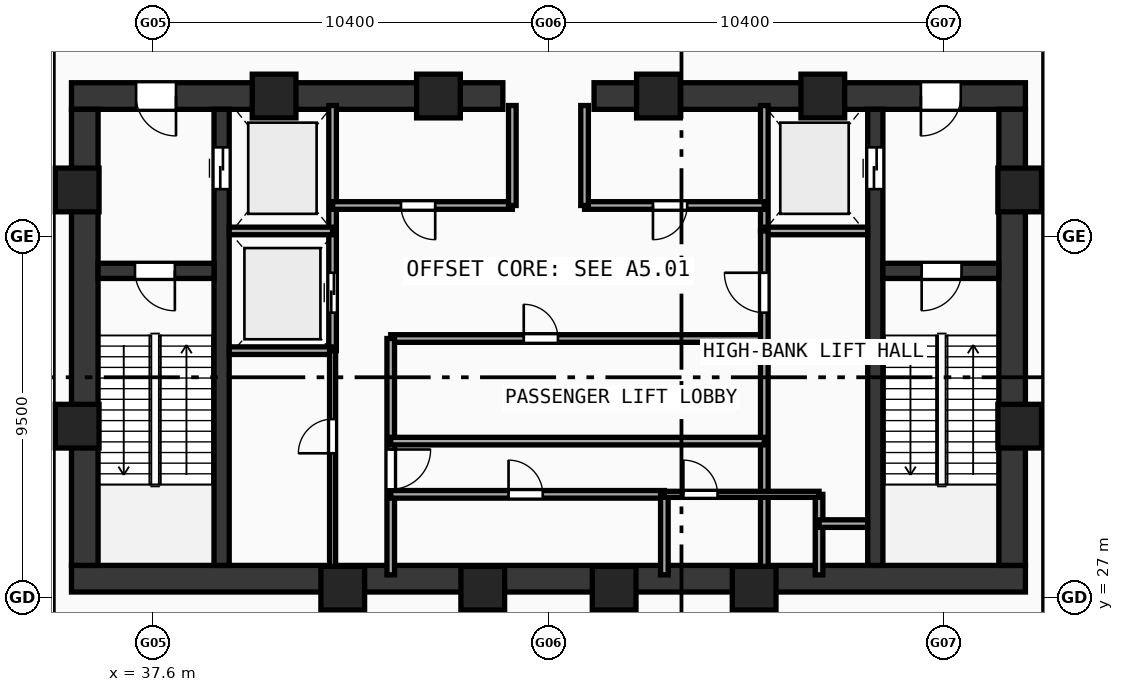
"""IFC4 building model, lengths in metres.
Left out: names, types, materials, properties, quantities, classifications, styles, units other than length and angle.
Written with IfcOpenShell. Run it as: python <this file> out.ifc"""

import sys

from ifc_helpers import new_model, si_unit, direction, frame, frame_2d, origin, origin_with_axes, origin_2d, place, context, subcontext, project, spatial, rectangle, hollow_rectangle, extrude, source, transform, mapped, element, fill, save


model = new_model("IFC4")
c1 = context("Model", 3, precision=1e-05, world=origin(), true_north=direction((0.0, 1.0)))
c2 = subcontext(c1, "Body", "Model", "MODEL_VIEW")
j1 = project(units=[si_unit("LENGTHUNIT", "METRE"), si_unit("PLANEANGLEUNIT", "RADIAN")], contexts=[c1])
p1 = place(None, origin())
s1 = spatial("IfcSite", under=j1, at=p1, CompositionType="ELEMENT")
p2 = place(p1, origin())
s2 = spatial("IfcBuilding", under=s1, at=p2, CompositionType="ELEMENT")
p3 = place(p2, frame((0.0, 0.0, -10.0)))
s3 = spatial("IfcBuildingStorey", under=s2, at=p3, CompositionType="ELEMENT", Elevation=-10.0)
p4 = place(p3, frame((35.45, 27.5, -0.6), z_axis=(0.0, 0.0, 1.0), x_axis=(1.0, 0.0, 0.0)))
e1 = element("IfcWall", 1, at=p4, inside=s3, PredefinedType="SHEAR", context=c2, shape_type="SweptSolid", body=[
    extrude(rectangle(XDim=25.1, YDim=0.7, at=frame_2d((12.55, 0.0))), origin(), (0.0, 0.0, 1.0), 5.5),
])
p5 = place(p3, frame((35.45, 40.2, -0.6), z_axis=(0.0, 0.0, 1.0), x_axis=(1.0, 0.0, 0.0)))
e2 = element("IfcWall", 2, at=p5, inside=s3, PredefinedType="SHEAR", context=c2, shape_type="SweptSolid", body=[
    extrude(rectangle(XDim=11.35, YDim=0.7, at=frame_2d((5.675, 0.0))), origin(), (0.0, 0.0, 1.0), 5.5),
])
p6 = place(p5, frame((1.7, 0.0, 0.6)))
e3 = element("IfcOpeningElement", 3, at=p6, cuts=e2, PredefinedType="OPENING", context=c2, shape_type="SweptSolid", body=[
    extrude(rectangle(XDim=1.05, YDim=2.1, at=frame_2d((0.525, 1.05))), frame((0.0, 0.36, 0.0), z_axis=(0.0, -1.0, 0.0), x_axis=(1.0, 0.0, 0.0)), (0.0, 0.0, 1.0), 0.72),
])
p7 = place(p3, frame((49.2, 40.2, -0.6), z_axis=(0.0, 0.0, 1.0), x_axis=(1.0, 0.0, 0.0)))
e4 = element("IfcWall", 4, at=p7, inside=s3, PredefinedType="SHEAR", context=c2, shape_type="SweptSolid", body=[
    extrude(rectangle(XDim=11.35, YDim=0.7, at=frame_2d((5.675, 0.0))), origin(), (0.0, 0.0, 1.0), 5.5),
])
p8 = place(p7, frame((8.6, 0.0, 0.6)))
e5 = element("IfcOpeningElement", 5, at=p8, cuts=e4, PredefinedType="OPENING", context=c2, shape_type="SweptSolid", body=[
    extrude(rectangle(XDim=1.05, YDim=2.1, at=frame_2d((0.525, 1.05))), frame((0.0, 0.36, 0.0), z_axis=(0.0, -1.0, 0.0), x_axis=(1.0, 0.0, 0.0)), (0.0, 0.0, 1.0), 0.72),
])
for number, where, z_axis, x_axis in (
    (6, (35.8, 27.85, -0.6), (0.0, 0.0, 1.0), (0.0, 1.0, 0.0)),
    (7, (60.2, 27.85, -0.6), (0.0, 0.0, 1.0), (0.0, 1.0, 0.0)),
):
    element("IfcWall", number, at=place(p3, frame(where, z_axis=z_axis, x_axis=x_axis)), inside=s3, PredefinedType="SHEAR", context=c2, shape_type="SweptSolid", body=[
        extrude(rectangle(XDim=12.0, YDim=0.7, at=frame_2d((6.0, 0.0))), origin(), (0.0, 0.0, 1.0), 5.5),
    ])
p9 = place(p3, frame((39.4, 27.85, -0.6), z_axis=(0.0, 0.0, 1.0), x_axis=(0.0, 1.0, 0.0)))
e8 = element("IfcWall", 8, at=p9, inside=s3, PredefinedType="SHEAR", context=c2, shape_type="SweptSolid", body=[
    extrude(rectangle(XDim=12.0, YDim=0.4, at=frame_2d((6.0, 0.0))), origin(), (0.0, 0.0, 1.0), 5.5),
])
p10 = place(p9, frame((9.9, 0.0, 0.6)))
e9 = element("IfcOpeningElement", 9, at=p10, cuts=e8, PredefinedType="OPENING", context=c2, shape_type="SweptSolid", body=[
    extrude(rectangle(XDim=1.1, YDim=2.1, at=frame_2d((0.55, 1.05))), frame((0.0, 0.21, 0.0), z_axis=(0.0, -1.0, 0.0), x_axis=(1.0, 0.0, 0.0)), (0.0, 0.0, 1.0), 0.42),
])
p11 = place(p3, frame((56.6, 27.85, -0.6), z_axis=(0.0, 0.0, 1.0), x_axis=(0.0, 1.0, 0.0)))
e10 = element("IfcWall", 10, at=p11, inside=s3, PredefinedType="SHEAR", context=c2, shape_type="SweptSolid", body=[
    extrude(rectangle(XDim=12.0, YDim=0.4, at=frame_2d((6.0, 0.0))), origin(), (0.0, 0.0, 1.0), 5.5),
])
p12 = place(p11, frame((9.9, 0.0, 0.6)))
e11 = element("IfcOpeningElement", 11, at=p12, cuts=e10, PredefinedType="OPENING", context=c2, shape_type="SweptSolid", body=[
    extrude(rectangle(XDim=1.1, YDim=2.1, at=frame_2d((0.55, 1.05))), frame((0.0, 0.21, 0.0), z_axis=(0.0, -1.0, 0.0), x_axis=(1.0, 0.0, 0.0)), (0.0, 0.0, 1.0), 0.42),
])
p13 = place(p3, frame((36.15, 35.6, -0.6), z_axis=(0.0, 0.0, 1.0), x_axis=(1.0, 0.0, 0.0)))
e12 = element("IfcWall", 12, at=p13, inside=s3, PredefinedType="SHEAR", context=c2, shape_type="SweptSolid", body=[
    extrude(rectangle(XDim=3.05, YDim=0.4, at=frame_2d((1.525, 0.0))), origin(), (0.0, 0.0, 1.0), 5.5),
])
p14 = place(p13, frame((0.97, 0.0, 0.6)))
e13 = element("IfcOpeningElement", 13, at=p14, cuts=e12, PredefinedType="OPENING", context=c2, shape_type="SweptSolid", body=[
    extrude(rectangle(XDim=1.05, YDim=2.1, at=frame_2d((0.525, 1.05))), frame((0.0, 0.21, 0.0), z_axis=(0.0, -1.0, 0.0), x_axis=(1.0, 0.0, 0.0)), (0.0, 0.0, 1.0), 0.42),
])
p15 = place(p3, frame((56.8, 35.6, -0.6), z_axis=(0.0, 0.0, 1.0), x_axis=(1.0, 0.0, 0.0)))
e14 = element("IfcWall", 14, at=p15, inside=s3, PredefinedType="SHEAR", context=c2, shape_type="SweptSolid", body=[
    extrude(rectangle(XDim=3.05, YDim=0.4, at=frame_2d((1.525, 0.0))), origin(), (0.0, 0.0, 1.0), 5.5),
])
p16 = place(p15, frame((1.02, 0.0, 0.6)))
e15 = element("IfcOpeningElement", 15, at=p16, cuts=e14, PredefinedType="OPENING", context=c2, shape_type="SweptSolid", body=[
    extrude(rectangle(XDim=1.05, YDim=2.1, at=frame_2d((0.525, 1.05))), frame((0.0, 0.21, 0.0), z_axis=(0.0, -1.0, 0.0), x_axis=(1.0, 0.0, 0.0)), (0.0, 0.0, 1.0), 0.42),
])
m1 = source(origin(), c2, "Body", "SweptSolid", [
    extrude(hollow_rectangle(XDim=1.15, YDim=1.15, WallThickness=0.048, at=origin_2d()), origin(), (0.0, 0.0, 1.0), 5.5),
])
for number, where, z_axis, x_axis in (
    (16, (42.588, 27.25, -0.6), (0.0, 0.0, 1.0), (1.0, 0.0, 0.0)),
    (17, (46.272, 27.25, -0.6), (0.0, 0.0, 1.0), (1.0, 0.0, 0.0)),
    (18, (49.729, 27.25, -0.6), (0.0, 0.0, 1.0), (1.0, 0.0, 0.0)),
    (19, (53.412, 27.25, -0.6), (0.0, 0.0, 1.0), (1.0, 0.0, 0.0)),
    (20, (60.4, 31.513, -0.6), (0.0, 0.0, 1.0), (1.0, 0.0, 0.0)),
    (21, (60.4, 37.729, -0.6), (0.0, 0.0, 1.0), (1.0, 0.0, 0.0)),
    (22, (55.219, 40.2, -0.6), (0.0, 0.0, 1.0), (1.0, 0.0, 0.0)),
    (23, (50.894, 40.2, -0.6), (0.0, 0.0, 1.0), (1.0, 0.0, 0.0)),
    (24, (45.106, 40.2, -0.6), (0.0, 0.0, 1.0), (1.0, 0.0, 0.0)),
    (25, (40.781, 40.2, -0.6), (0.0, 0.0, 1.0), (1.0, 0.0, 0.0)),
    (26, (35.6, 37.729, -0.6), (0.0, 0.0, 1.0), (1.0, 0.0, 0.0)),
    (27, (35.6, 31.513, -0.6), (0.0, 0.0, 1.0), (1.0, 0.0, 0.0)),
):
    element("IfcColumn", number, at=place(p3, frame(where, z_axis=z_axis, x_axis=x_axis)), inside=s3, PredefinedType="COLUMN", context=c2, shape_type="MappedRepresentation", body=[
        mapped(m1, transform((0.0, 0.0, 0.0), scale=1.0)),
    ])
p17 = place(p3, frame((42.32, 33.5, 0.0), z_axis=(0.0, 0.0, 1.0), x_axis=(0.0, 1.0, 0.0)))
e28 = element("IfcWall", 28, at=p17, inside=s3, PredefinedType="SOLIDWALL", context=c2, shape_type="SweptSolid", body=[
    extrude(rectangle(XDim=6.45, YDim=0.2, at=frame_2d((3.225, 0.0))), origin(), (0.0, 0.0, 1.0), 4.9),
])
p18 = place(p17, frame((1.0, 0.0, 0.0)))
e29 = element("IfcOpeningElement", 29, at=p18, cuts=e28, PredefinedType="OPENING", context=c2, shape_type="SweptSolid", body=[
    extrude(rectangle(XDim=1.05, YDim=2.1, at=frame_2d((0.525, 1.05))), frame((0.0, 0.11, 0.0), z_axis=(0.0, -1.0, 0.0), x_axis=(1.0, 0.0, 0.0)), (0.0, 0.0, 1.0), 0.22),
])
for number, where, z_axis, x_axis in (
    (30, (39.6, 36.65, 0.0), (0.0, 0.0, 1.0), (1.0, 0.0, 0.0)),
    (31, (39.6, 33.5, 0.0), (0.0, 0.0, 1.0), (1.0, 0.0, 0.0)),
):
    element("IfcWall", number, at=place(p3, frame(where, z_axis=z_axis, x_axis=x_axis)), inside=s3, PredefinedType="SOLIDWALL", context=c2, shape_type="SweptSolid", body=[
        extrude(rectangle(XDim=2.72, YDim=0.2, at=frame_2d((1.36, 0.0))), origin(), (0.0, 0.0, 1.0), 4.9),
    ])
p19 = place(p3, frame((53.68, 36.65, 0.0), z_axis=(0.0, 0.0, 1.0), x_axis=(0.0, 1.0, 0.0)))
e32 = element("IfcWall", 32, at=p19, inside=s3, PredefinedType="SOLIDWALL", context=c2, shape_type="SweptSolid", body=[
    extrude(rectangle(XDim=3.3, YDim=0.2, at=frame_2d((1.65, 0.0))), origin(), (0.0, 0.0, 1.0), 4.9),
])
p20 = place(p3, frame((53.68, 36.65, 0.0), z_axis=(0.0, 0.0, 1.0), x_axis=(1.0, 0.0, 0.0)))
e33 = element("IfcWall", 33, at=p20, inside=s3, PredefinedType="SOLIDWALL", context=c2, shape_type="SweptSolid", body=[
    extrude(rectangle(XDim=2.72, YDim=0.2, at=frame_2d((1.36, 0.0))), origin(), (0.0, 0.0, 1.0), 4.9),
])
p21 = place(p3, frame((42.32, 37.32, 0.0), z_axis=(0.0, 0.0, 1.0), x_axis=(1.0, 0.0, 0.0)))
e34 = element("IfcWall", 34, at=p21, inside=s3, PredefinedType="SOLIDWALL", context=c2, shape_type="SweptSolid", body=[
    extrude(rectangle(XDim=4.73, YDim=0.2, at=frame_2d((2.365, 0.0))), origin(), (0.0, 0.0, 1.0), 4.9),
])
p22 = place(p21, frame((1.8, 0.0, 0.0)))
e35 = element("IfcOpeningElement", 35, at=p22, cuts=e34, PredefinedType="OPENING", context=c2, shape_type="SweptSolid", body=[
    extrude(rectangle(XDim=0.9, YDim=2.1, at=frame_2d((0.45, 1.05))), frame((0.0, 0.11, 0.0), z_axis=(0.0, -1.0, 0.0), x_axis=(1.0, 0.0, 0.0)), (0.0, 0.0, 1.0), 0.22),
])
p23 = place(p3, frame((48.95, 37.32, 0.0), z_axis=(0.0, 0.0, 1.0), x_axis=(1.0, 0.0, 0.0)))
e36 = element("IfcWall", 36, at=p23, inside=s3, PredefinedType="SOLIDWALL", context=c2, shape_type="SweptSolid", body=[
    extrude(rectangle(XDim=4.73, YDim=0.2, at=frame_2d((2.365, 0.0))), origin(), (0.0, 0.0, 1.0), 4.9),
])
p24 = place(p23, frame((1.8, 0.0, 0.0)))
e37 = element("IfcOpeningElement", 37, at=p24, cuts=e36, PredefinedType="OPENING", context=c2, shape_type="SweptSolid", body=[
    extrude(rectangle(XDim=0.9, YDim=2.1, at=frame_2d((0.45, 1.05))), frame((0.0, 0.11, 0.0), z_axis=(0.0, -1.0, 0.0), x_axis=(1.0, 0.0, 0.0)), (0.0, 0.0, 1.0), 0.22),
])
for number, where, z_axis, x_axis in (
    (38, (47.05, 37.32, 0.0), (0.0, 0.0, 1.0), (0.0, 1.0, 0.0)),
    (39, (48.95, 37.32, 0.0), (0.0, 0.0, 1.0), (0.0, 1.0, 0.0)),
):
    element("IfcWall", number, at=place(p3, frame(where, z_axis=z_axis, x_axis=x_axis)), inside=s3, PredefinedType="SOLIDWALL", context=c2, shape_type="SweptSolid", body=[
        extrude(rectangle(XDim=2.63, YDim=0.2, at=frame_2d((1.315, 0.0))), origin(), (0.0, 0.0, 1.0), 4.9),
    ])
p25 = place(p3, frame((43.85, 33.82, 0.0), z_axis=(0.0, 0.0, 1.0), x_axis=(1.0, 0.0, 0.0)))
e40 = element("IfcWall", 40, at=p25, inside=s3, PredefinedType="SOLIDWALL", context=c2, shape_type="SweptSolid", body=[
    extrude(rectangle(XDim=9.83, YDim=0.2, at=frame_2d((4.915, 0.0))), origin(), (0.0, 0.0, 1.0), 4.9),
])
p26 = place(p25, frame((3.5, 0.0, 0.0)))
e41 = element("IfcOpeningElement", 41, at=p26, cuts=e40, PredefinedType="OPENING", context=c2, shape_type="SweptSolid", body=[
    extrude(rectangle(XDim=0.9, YDim=2.1, at=frame_2d((0.45, 1.05))), frame((0.0, 0.11, 0.0), z_axis=(0.0, -1.0, 0.0), x_axis=(1.0, 0.0, 0.0)), (0.0, 0.0, 1.0), 0.22),
])
p27 = place(p3, frame((43.85, 27.6, 0.0), z_axis=(0.0, 0.0, 1.0), x_axis=(0.0, 1.0, 0.0)))
e42 = element("IfcWall", 42, at=p27, inside=s3, PredefinedType="SOLIDWALL", context=c2, shape_type="SweptSolid", body=[
    extrude(rectangle(XDim=6.22, YDim=0.2, at=frame_2d((3.11, 0.0))), origin(), (0.0, 0.0, 1.0), 4.9),
])
p28 = place(p27, frame((2.25, 0.0, 0.0)))
e43 = element("IfcOpeningElement", 43, at=p28, cuts=e42, PredefinedType="OPENING", context=c2, shape_type="SweptSolid", body=[
    extrude(rectangle(XDim=1.05, YDim=2.1, at=frame_2d((0.525, 1.05))), frame((0.0, 0.11, 0.0), z_axis=(0.0, -1.0, 0.0), x_axis=(1.0, 0.0, 0.0)), (0.0, 0.0, 1.0), 0.22),
])
p29 = place(p3, frame((53.68, 27.6, 0.0), z_axis=(0.0, 0.0, 1.0), x_axis=(0.0, 1.0, 0.0)))
e44 = element("IfcWall", 44, at=p29, inside=s3, PredefinedType="SOLIDWALL", context=c2, shape_type="SweptSolid", body=[
    extrude(rectangle(XDim=9.05, YDim=0.2, at=frame_2d((4.525, 0.0))), origin(), (0.0, 0.0, 1.0), 4.9),
])
p30 = place(p29, frame((6.9, 0.0, 0.0)))
e45 = element("IfcOpeningElement", 45, at=p30, cuts=e44, PredefinedType="OPENING", context=c2, shape_type="SweptSolid", body=[
    extrude(rectangle(XDim=1.05, YDim=2.1, at=frame_2d((0.525, 1.05))), frame((0.0, 0.11, 0.0), z_axis=(0.0, -1.0, 0.0), x_axis=(1.0, 0.0, 0.0)), (0.0, 0.0, 1.0), 0.22),
])
p31 = place(p3, frame((43.85, 29.72, 0.0), z_axis=(0.0, 0.0, 1.0), x_axis=(1.0, 0.0, 0.0)))
e46 = element("IfcWall", 46, at=p31, inside=s3, PredefinedType="SOLIDWALL", context=c2, shape_type="SweptSolid", body=[
    extrude(rectangle(XDim=7.2, YDim=0.2, at=frame_2d((3.6, 0.0))), origin(), (0.0, 0.0, 1.0), 4.9),
])
p32 = place(p31, frame((3.1, 0.0, 0.0)))
e47 = element("IfcOpeningElement", 47, at=p32, cuts=e46, PredefinedType="OPENING", context=c2, shape_type="SweptSolid", body=[
    extrude(rectangle(XDim=0.9, YDim=2.1, at=frame_2d((0.45, 1.05))), frame((0.0, 0.11, 0.0), z_axis=(0.0, -1.0, 0.0), x_axis=(1.0, 0.0, 0.0)), (0.0, 0.0, 1.0), 0.22),
])
p33 = place(p3, frame((51.05, 27.6, 0.0), z_axis=(0.0, 0.0, 1.0), x_axis=(0.0, 1.0, 0.0)))
e48 = element("IfcWall", 48, at=p33, inside=s3, PredefinedType="SOLIDWALL", context=c2, shape_type="SweptSolid", body=[
    extrude(rectangle(XDim=2.12, YDim=0.2, at=frame_2d((1.06, 0.0))), origin(), (0.0, 0.0, 1.0), 4.9),
])
p34 = place(p3, frame((43.85, 31.12, 0.0), z_axis=(0.0, 0.0, 1.0), x_axis=(1.0, 0.0, 0.0)))
e49 = element("IfcWall", 49, at=p34, inside=s3, PredefinedType="SOLIDWALL", context=c2, shape_type="SweptSolid", body=[
    extrude(rectangle(XDim=9.83, YDim=0.2, at=frame_2d((4.915, 0.0))), origin(), (0.0, 0.0, 1.0), 4.9),
])
p35 = place(p3, frame((55.12, 27.6, 0.0), z_axis=(0.0, 0.0, 1.0), x_axis=(0.0, 1.0, 0.0)))
e50 = element("IfcWall", 50, at=p35, inside=s3, PredefinedType="SOLIDWALL", context=c2, shape_type="SweptSolid", body=[
    extrude(rectangle(XDim=2.12, YDim=0.2, at=frame_2d((1.06, 0.0))), origin(), (0.0, 0.0, 1.0), 4.9),
])
p36 = place(p3, frame((55.12, 28.95, 0.0), z_axis=(0.0, 0.0, 1.0), x_axis=(1.0, 0.0, 0.0)))
e51 = element("IfcWall", 51, at=p36, inside=s3, PredefinedType="SOLIDWALL", context=c2, shape_type="SweptSolid", body=[
    extrude(rectangle(XDim=1.28, YDim=0.2, at=frame_2d((0.64, 0.0))), origin(), (0.0, 0.0, 1.0), 4.9),
])
p37 = place(p3, frame((42.32, 27.6, 0.0), z_axis=(0.0, 0.0, 1.0), x_axis=(0.0, 1.0, 0.0)))
e52 = element("IfcWall", 52, at=p37, inside=s3, PredefinedType="PARTITIONING", context=c2, shape_type="SweptSolid", body=[
    extrude(rectangle(XDim=5.9, YDim=0.16, at=frame_2d((2.95, 0.0))), origin(), (0.0, 0.0, 1.0), 4.9),
])
p38 = place(p37, frame((3.2, 0.0, 0.0)))
e53 = element("IfcOpeningElement", 53, at=p38, cuts=e52, PredefinedType="OPENING", context=c2, shape_type="SweptSolid", body=[
    extrude(rectangle(XDim=0.9, YDim=2.1, at=frame_2d((0.45, 1.05))), frame((0.0, 0.09, 0.0), z_axis=(0.0, -1.0, 0.0), x_axis=(1.0, 0.0, 0.0)), (0.0, 0.0, 1.0), 0.18),
])
p39 = place(p3, frame((51.05, 29.72, 0.0), z_axis=(0.0, 0.0, 1.0), x_axis=(1.0, 0.0, 0.0)))
e54 = element("IfcWall", 54, at=p39, inside=s3, PredefinedType="PARTITIONING", context=c2, shape_type="SweptSolid", body=[
    extrude(rectangle(XDim=4.07, YDim=0.16, at=frame_2d((2.035, 0.0))), origin(), (0.0, 0.0, 1.0), 4.9),
])
p40 = place(p39, frame((0.5, 0.0, 0.0)))
e55 = element("IfcOpeningElement", 55, at=p40, cuts=e54, PredefinedType="OPENING", context=c2, shape_type="SweptSolid", body=[
    extrude(rectangle(XDim=0.9, YDim=2.1, at=frame_2d((0.45, 1.05))), frame((0.0, 0.09, 0.0), z_axis=(0.0, -1.0, 0.0), x_axis=(1.0, 0.0, 0.0)), (0.0, 0.0, 1.0), 0.18),
])
m2 = source(origin(), c2, "Body", "SweptSolid", [
    extrude(rectangle(XDim=1.05, YDim=2.1, at=frame_2d((0.525, 1.05))), frame((0.0, 0.025, 0.0), z_axis=(0.0, -1.0, 0.0), x_axis=(1.0, 0.0, 0.0)), (0.0, 0.0, 1.0), 0.05),
])
p41 = place(p14, frame((1.05, 0.0, 0.0), z_axis=(0.0, 0.0, 1.0), x_axis=(-1.0, 0.0, 0.0)))
e56 = element("IfcDoor", 56, at=p41, inside=s3, OperationType="SINGLE_SWING_LEFT", PredefinedType="DOOR", context=c2, shape_type="MappedRepresentation", body=[
    mapped(m2, transform((0.0, 0.0, 0.0), scale=1.0)),
])
fill(e13, e56)
p42 = place(p16, frame((1.05, 0.0, 0.0), z_axis=(0.0, 0.0, 1.0), x_axis=(-1.0, 0.0, 0.0)))
e57 = element("IfcDoor", 57, at=p42, inside=s3, OperationType="SINGLE_SWING_RIGHT", PredefinedType="DOOR", context=c2, shape_type="MappedRepresentation", body=[
    mapped(m2, transform((0.0, 0.0, 0.0), scale=1.0)),
])
fill(e15, e57)
p43 = place(p6, frame((1.05, 0.0, 0.0), z_axis=(0.0, 0.0, 1.0), x_axis=(-1.0, 0.0, 0.0)))
e58 = element("IfcDoor", 58, at=p43, inside=s3, OperationType="SINGLE_SWING_LEFT", PredefinedType="DOOR", context=c2, shape_type="MappedRepresentation", body=[
    mapped(m2, transform((0.0, 0.0, 0.0), scale=1.0)),
])
fill(e3, e58)
p44 = place(p8, frame((1.05, 0.0, 0.0), z_axis=(0.0, 0.0, 1.0), x_axis=(-1.0, 0.0, 0.0)))
e59 = element("IfcDoor", 59, at=p44, inside=s3, OperationType="SINGLE_SWING_RIGHT", PredefinedType="DOOR", context=c2, shape_type="MappedRepresentation", body=[
    mapped(m2, transform((0.0, 0.0, 0.0), scale=1.0)),
])
fill(e5, e59)
m3 = source(origin(), c2, "Body", "SweptSolid", [
    extrude(rectangle(XDim=1.1, YDim=2.1, at=frame_2d((0.55, 1.05))), frame((0.0, 0.025, 0.0), z_axis=(0.0, -1.0, 0.0), x_axis=(1.0, 0.0, 0.0)), (0.0, 0.0, 1.0), 0.05),
])
p45 = place(p10, frame((1.1, 0.0, 0.0), z_axis=(0.0, 0.0, 1.0), x_axis=(-1.0, 0.0, 0.0)))
e60 = element("IfcDoor", 60, at=p45, inside=s3, OperationType="DOUBLE_DOOR_SLIDING", PredefinedType="DOOR", context=c2, shape_type="MappedRepresentation", body=[
    mapped(m3, transform((0.0, 0.0, 0.0), scale=1.0)),
])
fill(e9, e60)
p46 = place(p12, origin_with_axes())
e61 = element("IfcDoor", 61, at=p46, inside=s3, OperationType="DOUBLE_DOOR_SLIDING", PredefinedType="DOOR", context=c2, shape_type="MappedRepresentation", body=[
    mapped(m3, transform((0.0, 0.0, 0.0), scale=1.0)),
])
fill(e11, e61)
p47 = place(p18, origin_with_axes())
e62 = element("IfcDoor", 62, at=p47, inside=s3, OperationType="DOUBLE_DOOR_SLIDING", PredefinedType="DOOR", context=c2, shape_type="MappedRepresentation", body=[
    mapped(m2, transform((0.0, 0.0, 0.0), scale=1.0)),
])
fill(e29, e62)
m4 = source(origin(), c2, "Body", "SweptSolid", [
    extrude(rectangle(XDim=0.9, YDim=2.1, at=frame_2d((0.45, 1.05))), frame((0.0, 0.025, 0.0), z_axis=(0.0, -1.0, 0.0), x_axis=(1.0, 0.0, 0.0)), (0.0, 0.0, 1.0), 0.05),
])
p48 = place(p22, frame((0.9, 0.0, 0.0), z_axis=(0.0, 0.0, 1.0), x_axis=(-1.0, 0.0, 0.0)))
e63 = element("IfcDoor", 63, at=p48, inside=s3, OperationType="SINGLE_SWING_LEFT", PredefinedType="DOOR", context=c2, shape_type="MappedRepresentation", body=[
    mapped(m4, transform((0.0, 0.0, 0.0), scale=1.0)),
])
fill(e35, e63)
p49 = place(p24, frame((0.9, 0.0, 0.0), z_axis=(0.0, 0.0, 1.0), x_axis=(-1.0, 0.0, 0.0)))
e64 = element("IfcDoor", 64, at=p49, inside=s3, OperationType="SINGLE_SWING_RIGHT", PredefinedType="DOOR", context=c2, shape_type="MappedRepresentation", body=[
    mapped(m4, transform((0.0, 0.0, 0.0), scale=1.0)),
])
fill(e37, e64)
p50 = place(p26, origin_with_axes())
e65 = element("IfcDoor", 65, at=p50, inside=s3, OperationType="SINGLE_SWING_LEFT", PredefinedType="DOOR", context=c2, shape_type="MappedRepresentation", body=[
    mapped(m4, transform((0.0, 0.0, 0.0), scale=1.0)),
])
fill(e41, e65)
p51 = place(p28, frame((1.05, 0.0, 0.0), z_axis=(0.0, 0.0, 1.0), x_axis=(-1.0, 0.0, 0.0)))
e66 = element("IfcDoor", 66, at=p51, inside=s3, OperationType="SINGLE_SWING_LEFT", PredefinedType="DOOR", context=c2, shape_type="MappedRepresentation", body=[
    mapped(m2, transform((0.0, 0.0, 0.0), scale=1.0)),
])
fill(e43, e66)
p52 = place(p30, origin_with_axes())
e67 = element("IfcDoor", 67, at=p52, inside=s3, OperationType="SINGLE_SWING_RIGHT", PredefinedType="DOOR", context=c2, shape_type="MappedRepresentation", body=[
    mapped(m2, transform((0.0, 0.0, 0.0), scale=1.0)),
])
fill(e45, e67)
p53 = place(p32, origin_with_axes())
e68 = element("IfcDoor", 68, at=p53, inside=s3, OperationType="SINGLE_SWING_LEFT", PredefinedType="DOOR", context=c2, shape_type="MappedRepresentation", body=[
    mapped(m4, transform((0.0, 0.0, 0.0), scale=1.0)),
])
fill(e47, e68)
p54 = place(p38, origin_with_axes())
e69 = element("IfcDoor", 69, at=p54, inside=s3, OperationType="SINGLE_SWING_LEFT", PredefinedType="DOOR", context=c2, shape_type="MappedRepresentation", body=[
    mapped(m4, transform((0.0, 0.0, 0.0), scale=1.0)),
])
fill(e53, e69)
p55 = place(p40, origin_with_axes())
e70 = element("IfcDoor", 70, at=p55, inside=s3, OperationType="SINGLE_SWING_LEFT", PredefinedType="DOOR", context=c2, shape_type="MappedRepresentation", body=[
    mapped(m4, transform((0.0, 0.0, 0.0), scale=1.0)),
])
fill(e55, e70)
save(model, sys.argv[1])
